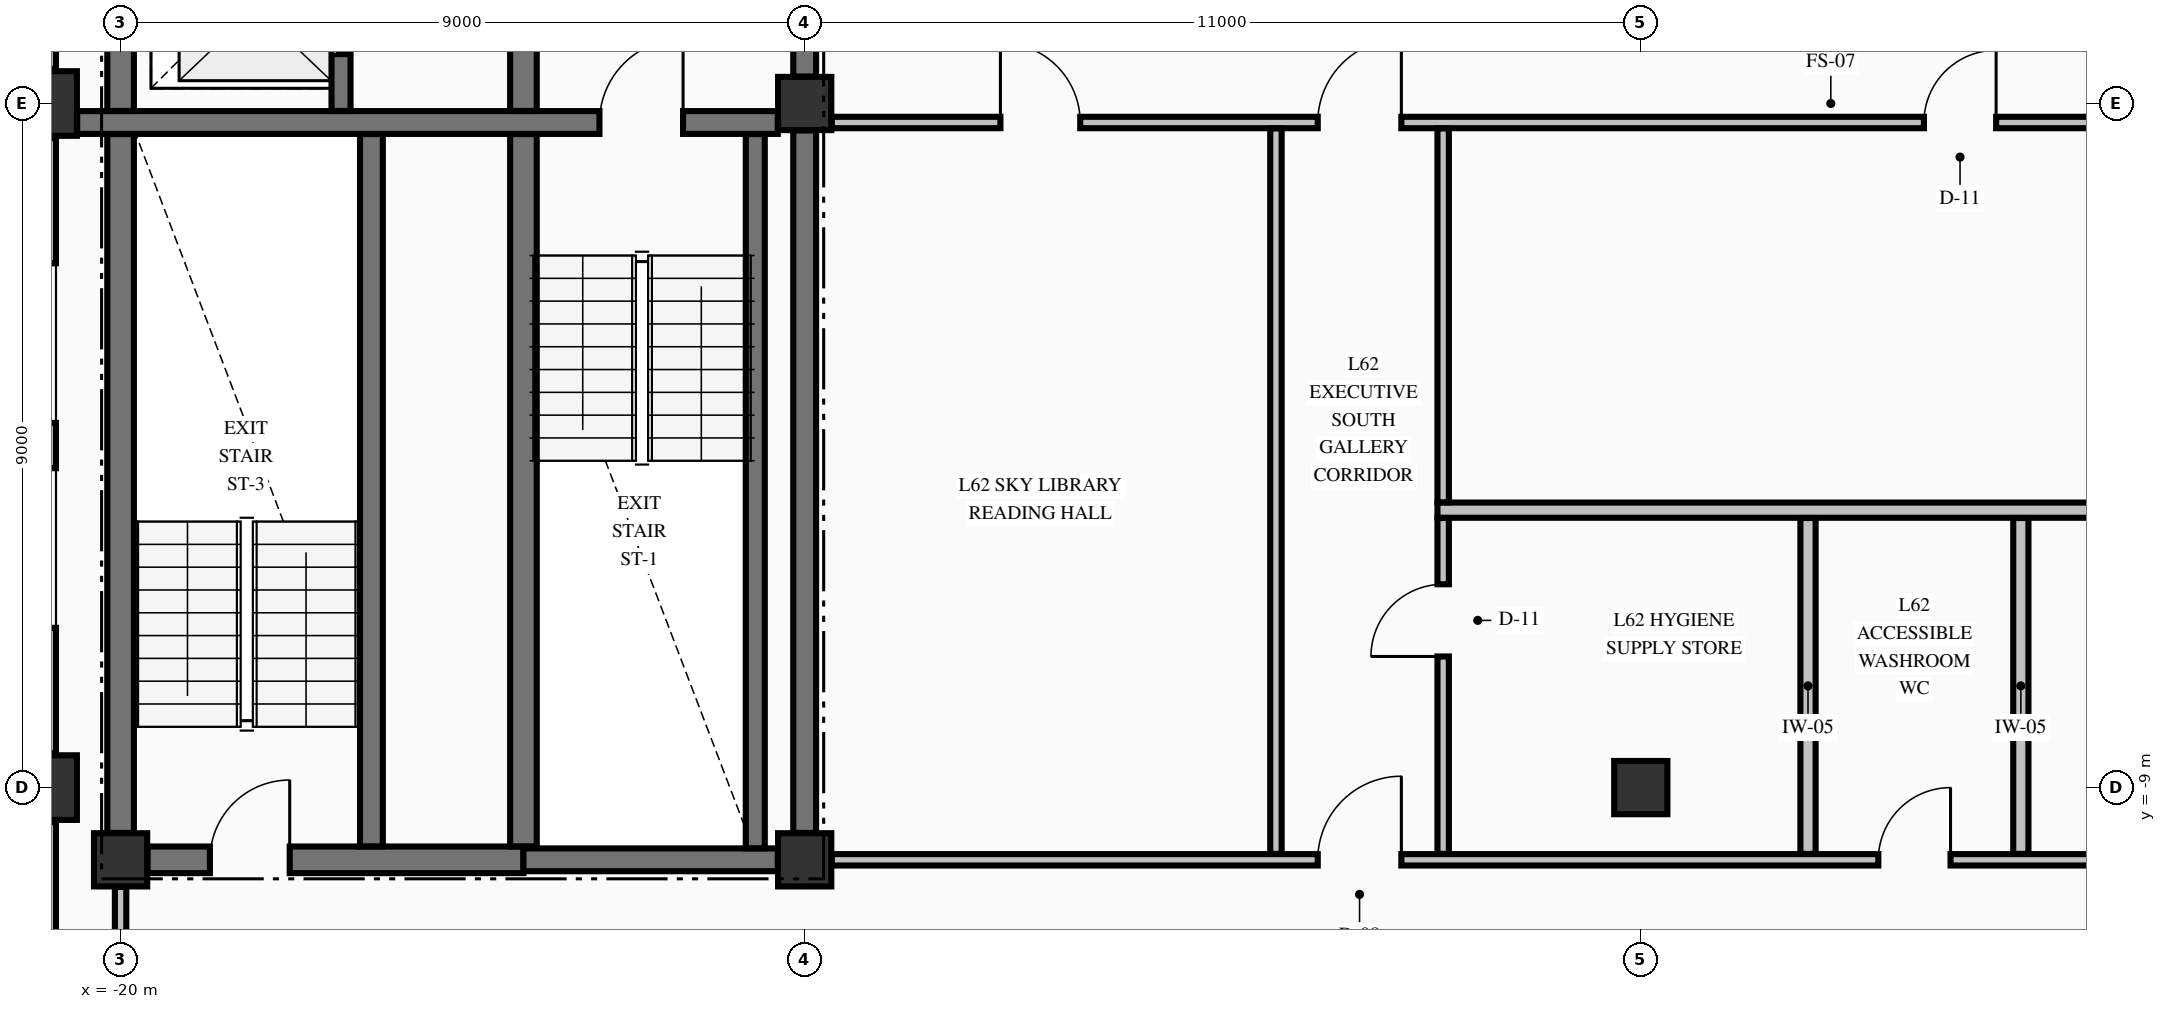
"""IFC4 building model, lengths in metres.
Left out: names, types, materials, properties, quantities, classifications, styles, units other than length and angle.
Written with IfcOpenShell. Run it as: python <this file> out.ifc"""

import sys

from ifc_helpers import new_model, si_unit, direction, frame, frame_2d, origin, origin_2d, place, context, subcontext, project, spatial, rectangle, extrude, element, fill, save


model = new_model("IFC4")
c1 = context("Model", 3, precision=1e-05, world=origin(), true_north=direction((0.0, 1.0)))
c2 = subcontext(c1, "Body", "Model", "MODEL_VIEW")
j1 = project(units=[si_unit("LENGTHUNIT", "METRE"), si_unit("PLANEANGLEUNIT", "RADIAN")], contexts=[c1])
p1 = place(None, origin())
s1 = spatial("IfcSite", under=j1, at=p1, CompositionType="ELEMENT")
p2 = place(p1, origin())
s2 = spatial("IfcBuilding", under=s1, at=p2, CompositionType="ELEMENT")
p3 = place(p2, frame((0.0, 0.0, 236.51)))
s3 = spatial("IfcBuildingStorey", under=s2, at=p3, CompositionType="ELEMENT", Elevation=236.51)
for number, where, z_axis, x_axis in (
    (1, (-21.0, -9.0, -0.25), (0.0, 0.0, 1.0), (1.0, 0.0, 0.0)),
    (2, (-21.0, 0.0, -0.25), (0.0, 0.0, 1.0), (1.0, 0.0, 0.0)),
):
    element("IfcColumn", number, at=place(p3, frame(where, z_axis=z_axis, x_axis=x_axis)), inside=s3, PredefinedType="COLUMN", context=c2, shape_type="SweptSolid", body=[
        extrude(rectangle(XDim=0.85, YDim=0.85, at=origin_2d()), origin(), (0.0, 0.0, 1.0), 3.23),
    ])
for number, where, z_axis, x_axis in (
    (3, (-20.0, -9.95, -0.25), (0.0, 0.0, 1.0), (1.0, 0.0, 0.0)),
    (4, (-11.0, -9.95, -0.25), (0.0, 0.0, 1.0), (1.0, 0.0, 0.0)),
    (5, (-11.0, 0.0, -0.25), (0.0, 0.0, 1.0), (1.0, 0.0, 0.0)),
    (6, (0.0, -9.0, -0.25), (0.0, 0.0, 1.0), (1.0, 0.0, 0.0)),
):
    element("IfcColumn", number, at=place(p3, frame(where, z_axis=z_axis, x_axis=x_axis)), inside=s3, PredefinedType="COLUMN", context=c2, shape_type="SweptSolid", body=[
        extrude(rectangle(XDim=0.7, YDim=0.7, at=origin_2d()), origin(), (0.0, 0.0, 1.0), 3.23),
    ])
p4 = place(p3, frame((-21.0, -9.455, 0.0), z_axis=(0.0, 0.0, 1.0), x_axis=(0.0, -1.0, 0.0)))
e7 = element("IfcWall", 7, at=p4, inside=s3, PredefinedType="STANDARD", context=c2, shape_type="SweptSolid", body=[
    extrude(rectangle(XDim=8.09, YDim=0.3, at=frame_2d((4.045, 0.0))), origin(), (0.0, 0.0, 1.0), 2.372),
])
p5 = place(p3, frame((-21.0, -0.455, 0.0), z_axis=(0.0, 0.0, 1.0), x_axis=(0.0, -1.0, 0.0)))
e8 = element("IfcWall", 8, at=p5, inside=s3, PredefinedType="STANDARD", context=c2, shape_type="SweptSolid", body=[
    extrude(rectangle(XDim=8.09, YDim=0.3, at=frame_2d((4.045, 0.0))), origin(), (0.0, 0.0, 1.0), 2.372),
])
p6 = place(p5, frame((1.647, 0.0, 0.7)))
e9 = element("IfcOpeningElement", 9, at=p6, cuts=e8, PredefinedType="OPENING", context=c2, shape_type="SweptSolid", body=[
    extrude(rectangle(XDim=2.1, YDim=1.5, at=frame_2d((1.05, 0.75))), frame((0.0, 0.16, 0.0), z_axis=(0.0, -1.0, 0.0), x_axis=(1.0, 0.0, 0.0)), (0.0, 0.0, 1.0), 0.32),
])
p7 = place(p5, frame((4.343, 0.0, 0.7)))
e10 = element("IfcOpeningElement", 10, at=p7, cuts=e8, PredefinedType="OPENING", context=c2, shape_type="SweptSolid", body=[
    extrude(rectangle(XDim=2.1, YDim=1.5, at=frame_2d((1.05, 0.75))), frame((0.0, 0.16, 0.0), z_axis=(0.0, -1.0, 0.0), x_axis=(1.0, 0.0, 0.0)), (0.0, 0.0, 1.0), 0.32),
])
p8 = place(p3, frame((-21.0, 8.545, 0.0), z_axis=(0.0, 0.0, 1.0), x_axis=(0.0, -1.0, 0.0)))
e11 = element("IfcWall", 11, at=p8, inside=s3, PredefinedType="STANDARD", context=c2, shape_type="SweptSolid", body=[
    extrude(rectangle(XDim=8.09, YDim=0.3, at=frame_2d((4.045, 0.0))), origin(), (0.0, 0.0, 1.0), 2.372),
])
p9 = place(p8, frame((1.647, 0.0, 0.7)))
e12 = element("IfcOpeningElement", 12, at=p9, cuts=e11, PredefinedType="OPENING", context=c2, shape_type="SweptSolid", body=[
    extrude(rectangle(XDim=2.1, YDim=1.5, at=frame_2d((1.05, 0.75))), frame((0.0, 0.16, 0.0), z_axis=(0.0, -1.0, 0.0), x_axis=(1.0, 0.0, 0.0)), (0.0, 0.0, 1.0), 0.32),
])
p10 = place(p8, frame((4.343, 0.0, 0.7)))
e13 = element("IfcOpeningElement", 13, at=p10, cuts=e11, PredefinedType="OPENING", context=c2, shape_type="SweptSolid", body=[
    extrude(rectangle(XDim=2.1, YDim=1.5, at=frame_2d((1.05, 0.75))), frame((0.0, 0.16, 0.0), z_axis=(0.0, -1.0, 0.0), x_axis=(1.0, 0.0, 0.0)), (0.0, 0.0, 1.0), 0.32),
])
p11 = place(p3, frame((-19.646, -9.95, 0.0), z_axis=(0.0, 0.0, 1.0), x_axis=(1.0, 0.0, 0.0)))
e14 = element("IfcWall", 14, at=p11, inside=s3, PredefinedType="SHEAR", context=c2, shape_type="SweptSolid", body=[
    extrude(rectangle(XDim=4.946, YDim=0.35, at=frame_2d((2.473, 0.0))), origin(), (0.0, 0.0, 1.0), 2.98),
])
p12 = place(p11, frame((0.821, 0.0, 0.0)))
e15 = element("IfcOpeningElement", 15, at=p12, cuts=e14, PredefinedType="OPENING", context=c2, shape_type="SweptSolid", body=[
    extrude(rectangle(XDim=1.05, YDim=2.15, at=frame_2d((0.525, 1.075))), frame((0.0, 0.185, 0.0), z_axis=(0.0, -1.0, 0.0), x_axis=(1.0, 0.0, 0.0)), (0.0, 0.0, 1.0), 0.37),
])
p13 = place(p3, frame((-14.7, -9.95, 0.0), z_axis=(0.0, 0.0, 1.0), x_axis=(1.0, 0.0, 0.0)))
e16 = element("IfcWall", 16, at=p13, inside=s3, PredefinedType="SHEAR", context=c2, shape_type="SweptSolid", body=[
    extrude(rectangle(XDim=3.346, YDim=0.3, at=frame_2d((1.673, 0.0))), origin(), (0.0, 0.0, 1.0), 2.98),
])
p14 = place(p3, frame((-20.571, -0.25, 0.0), z_axis=(0.0, 0.0, 1.0), x_axis=(1.0, 0.0, 0.0)))
e17 = element("IfcWall", 17, at=p14, inside=s3, PredefinedType="SHEAR", context=c2, shape_type="SweptSolid", body=[
    extrude(rectangle(XDim=9.217, YDim=0.3, at=frame_2d((4.608, 0.0))), origin(), (0.0, 0.0, 1.0), 2.98),
])
p15 = place(p14, frame((6.871, 0.0, 0.0)))
e18 = element("IfcOpeningElement", 18, at=p15, cuts=e17, PredefinedType="OPENING", context=c2, shape_type="SweptSolid", body=[
    extrude(rectangle(XDim=1.1, YDim=2.15, at=frame_2d((0.55, 1.075))), frame((0.0, 0.16, 0.0), z_axis=(0.0, -1.0, 0.0), x_axis=(1.0, 0.0, 0.0)), (0.0, 0.0, 1.0), 0.32),
])
p16 = place(p3, frame((-10.644, -9.95, 0.0), z_axis=(0.0, 0.0, 1.0), x_axis=(1.0, 0.0, 0.0)))
e19 = element("IfcWall", 19, at=p16, inside=s3, PredefinedType="PARTITIONING", context=c2, shape_type="SweptSolid", body=[
    extrude(rectangle(XDim=21.288, YDim=0.15, at=frame_2d((10.644, 0.0))), origin(), (0.0, 0.0, 1.0), 2.98),
])
p17 = place(p16, frame((6.394, 0.0, 0.0)))
e20 = element("IfcOpeningElement", 20, at=p17, cuts=e19, PredefinedType="OPENING", context=c2, shape_type="SweptSolid", body=[
    extrude(rectangle(XDim=1.1, YDim=2.15, at=frame_2d((0.55, 1.075))), frame((0.0, 0.085, 0.0), z_axis=(0.0, -1.0, 0.0), x_axis=(1.0, 0.0, 0.0)), (0.0, 0.0, 1.0), 0.17),
])
p18 = place(p16, frame((13.769, 0.0, 0.0)))
e21 = element("IfcOpeningElement", 21, at=p18, cuts=e19, PredefinedType="OPENING", context=c2, shape_type="SweptSolid", body=[
    extrude(rectangle(XDim=0.95, YDim=2.15, at=frame_2d((0.475, 1.075))), frame((0.0, 0.085, 0.0), z_axis=(0.0, -1.0, 0.0), x_axis=(1.0, 0.0, 0.0)), (0.0, 0.0, 1.0), 0.17),
])
p19 = place(p16, frame((17.994, 0.0, 0.0)))
e22 = element("IfcOpeningElement", 22, at=p19, cuts=e19, PredefinedType="OPENING", context=c2, shape_type="SweptSolid", body=[
    extrude(rectangle(XDim=0.9, YDim=2.15, at=frame_2d((0.45, 1.075))), frame((0.0, 0.085, 0.0), z_axis=(0.0, -1.0, 0.0), x_axis=(1.0, 0.0, 0.0)), (0.0, 0.0, 1.0), 0.17),
])
p20 = place(p3, frame((-2.675, -5.35, 0.0), z_axis=(0.0, 0.0, 1.0), x_axis=(1.0, 0.0, 0.0)))
e23 = element("IfcWall", 23, at=p20, inside=s3, PredefinedType="PARTITIONING", context=c2, shape_type="SweptSolid", body=[
    extrude(rectangle(XDim=13.522, YDim=0.2, at=frame_2d((6.761, 0.0))), origin(), (0.0, 0.0, 1.0), 2.98),
])
p21 = place(p3, frame((-10.644, -0.25, 0.0), z_axis=(0.0, 0.0, 1.0), x_axis=(1.0, 0.0, 0.0)))
e24 = element("IfcWall", 24, at=p21, inside=s3, PredefinedType="PARTITIONING", context=c2, shape_type="SweptSolid", body=[
    extrude(rectangle(XDim=21.288, YDim=0.15, at=frame_2d((10.644, 0.0))), origin(), (0.0, 0.0, 1.0), 2.98),
])
p22 = place(p21, frame((6.394, 0.0, 0.0)))
e25 = element("IfcOpeningElement", 25, at=p22, cuts=e24, PredefinedType="OPENING", context=c2, shape_type="SweptSolid", body=[
    extrude(rectangle(XDim=1.1, YDim=2.15, at=frame_2d((0.55, 1.075))), frame((0.0, 0.085, 0.0), z_axis=(0.0, -1.0, 0.0), x_axis=(1.0, 0.0, 0.0)), (0.0, 0.0, 1.0), 0.17),
])
p23 = place(p21, frame((2.219, 0.0, 0.0)))
e26 = element("IfcOpeningElement", 26, at=p23, cuts=e24, PredefinedType="OPENING", context=c2, shape_type="SweptSolid", body=[
    extrude(rectangle(XDim=1.05, YDim=2.15, at=frame_2d((0.525, 1.075))), frame((0.0, 0.085, 0.0), z_axis=(0.0, -1.0, 0.0), x_axis=(1.0, 0.0, 0.0)), (0.0, 0.0, 1.0), 0.17),
])
p24 = place(p21, frame((14.369, 0.0, 0.0)))
e27 = element("IfcOpeningElement", 27, at=p24, cuts=e24, PredefinedType="OPENING", context=c2, shape_type="SweptSolid", body=[
    extrude(rectangle(XDim=0.95, YDim=2.15, at=frame_2d((0.475, 1.075))), frame((0.0, 0.085, 0.0), z_axis=(0.0, -1.0, 0.0), x_axis=(1.0, 0.0, 0.0)), (0.0, 0.0, 1.0), 0.17),
])
p25 = place(p3, frame((-20.0, -9.596, 0.0), z_axis=(0.0, 0.0, 1.0), x_axis=(0.0, 1.0, 0.0)))
e28 = element("IfcWall", 28, at=p25, inside=s3, PredefinedType="SHEAR", context=c2, shape_type="SweptSolid", body=[
    extrude(rectangle(XDim=9.194, YDim=0.35, at=frame_2d((4.597, 0.0))), origin(), (0.0, 0.0, 1.0), 2.98),
])
p26 = place(p3, frame((-20.0, -0.098, 0.0), z_axis=(0.0, 0.0, 1.0), x_axis=(0.0, 1.0, 0.0)))
e29 = element("IfcWall", 29, at=p26, inside=s3, PredefinedType="SHEAR", context=c2, shape_type="SweptSolid", body=[
    extrude(rectangle(XDim=2.621, YDim=0.35, at=frame_2d((1.311, 0.0))), origin(), (0.0, 0.0, 1.0), 2.98),
])
p27 = place(p3, frame((-17.1, -0.098, 0.0), z_axis=(0.0, 0.0, 1.0), x_axis=(0.0, 1.0, 0.0)))
e30 = element("IfcWall", 30, at=p27, inside=s3, PredefinedType="SOLIDWALL", context=c2, shape_type="SweptSolid", body=[
    extrude(rectangle(XDim=2.621, YDim=0.25, at=frame_2d((1.311, 0.0))), origin(), (0.0, 0.0, 1.0), 2.98),
])
p28 = place(p27, frame((0.748, 0.0, 0.0)))
e31 = element("IfcOpeningElement", 31, at=p28, cuts=e30, PredefinedType="OPENING", context=c2, shape_type="SweptSolid", body=[
    extrude(rectangle(XDim=1.1, YDim=2.2, at=frame_2d((0.55, 1.1))), frame((0.0, 0.135, 0.0), z_axis=(0.0, -1.0, 0.0), x_axis=(1.0, 0.0, 0.0)), (0.0, 0.0, 1.0), 0.27),
])
p29 = place(p3, frame((-16.7, -9.773, 0.0), z_axis=(0.0, 0.0, 1.0), x_axis=(0.0, 1.0, 0.0)))
e32 = element("IfcWall", 32, at=p29, inside=s3, PredefinedType="SHEAR", context=c2, shape_type="SweptSolid", body=[
    extrude(rectangle(XDim=9.371, YDim=0.3, at=frame_2d((4.686, 0.0))), origin(), (0.0, 0.0, 1.0), 2.98),
])
p30 = place(p3, frame((-14.7, -9.773, 0.0), z_axis=(0.0, 0.0, 1.0), x_axis=(0.0, 1.0, 0.0)))
e33 = element("IfcWall", 33, at=p30, inside=s3, PredefinedType="SHEAR", context=c2, shape_type="SweptSolid", body=[
    extrude(rectangle(XDim=9.371, YDim=0.35, at=frame_2d((4.686, 0.0))), origin(), (0.0, 0.0, 1.0), 2.98),
])
p31 = place(p3, frame((-14.7, -0.098, 0.0), z_axis=(0.0, 0.0, 1.0), x_axis=(0.0, 1.0, 0.0)))
e34 = element("IfcWall", 34, at=p31, inside=s3, PredefinedType="SHEAR", context=c2, shape_type="SweptSolid", body=[
    extrude(rectangle(XDim=2.846, YDim=0.35, at=frame_2d((1.423, 0.0))), origin(), (0.0, 0.0, 1.0), 2.98),
])
p32 = place(p3, frame((-11.65, -9.798, 0.0), z_axis=(0.0, 0.0, 1.0), x_axis=(0.0, 1.0, 0.0)))
e35 = element("IfcWall", 35, at=p32, inside=s3, PredefinedType="SOLIDWALL", context=c2, shape_type="SweptSolid", body=[
    extrude(rectangle(XDim=9.396, YDim=0.25, at=frame_2d((4.698, 0.0))), origin(), (0.0, 0.0, 1.0), 2.98),
])
p33 = place(p3, frame((-11.0, -9.596, 0.0), z_axis=(0.0, 0.0, 1.0), x_axis=(0.0, 1.0, 0.0)))
e36 = element("IfcWall", 36, at=p33, inside=s3, PredefinedType="SHEAR", context=c2, shape_type="SweptSolid", body=[
    extrude(rectangle(XDim=9.242, YDim=0.3, at=frame_2d((4.621, 0.0))), origin(), (0.0, 0.0, 1.0), 2.98),
])
p34 = place(p3, frame((-11.0, 0.354, 0.0), z_axis=(0.0, 0.0, 1.0), x_axis=(0.0, 1.0, 0.0)))
e37 = element("IfcWall", 37, at=p34, inside=s3, PredefinedType="SHEAR", context=c2, shape_type="SweptSolid", body=[
    extrude(rectangle(XDim=2.394, YDim=0.3, at=frame_2d((1.197, 0.0))), origin(), (0.0, 0.0, 1.0), 2.98),
])
p35 = place(p34, frame((0.746, 0.0, 0.0)))
e38 = element("IfcOpeningElement", 38, at=p35, cuts=e37, PredefinedType="OPENING", context=c2, shape_type="SweptSolid", body=[
    extrude(rectangle(XDim=1.1, YDim=2.15, at=frame_2d((0.55, 1.075))), frame((0.0, 0.16, 0.0), z_axis=(0.0, -1.0, 0.0), x_axis=(1.0, 0.0, 0.0)), (0.0, 0.0, 1.0), 0.32),
])
p36 = place(p3, frame((-20.0, -12.122, 0.0), z_axis=(0.0, 0.0, 1.0), x_axis=(0.0, 1.0, 0.0)))
e39 = element("IfcWall", 39, at=p36, inside=s3, PredefinedType="PARTITIONING", context=c2, shape_type="SweptSolid", body=[
    extrude(rectangle(XDim=1.816, YDim=0.15, at=frame_2d((0.908, 0.0))), origin(), (0.0, 0.0, 1.0), 2.57),
])
p37 = place(p3, frame((-4.8, -9.872, 0.0), z_axis=(0.0, 0.0, 1.0), x_axis=(0.0, 1.0, 0.0)))
e40 = element("IfcWall", 40, at=p37, inside=s3, PredefinedType="PARTITIONING", context=c2, shape_type="SweptSolid", body=[
    extrude(rectangle(XDim=9.544, YDim=0.15, at=frame_2d((4.772, 0.0))), origin(), (0.0, 0.0, 1.0), 2.98),
])
p38 = place(p3, frame((-2.6, -9.872, 0.0), z_axis=(0.0, 0.0, 1.0), x_axis=(0.0, 1.0, 0.0)))
e41 = element("IfcWall", 41, at=p38, inside=s3, PredefinedType="PARTITIONING", context=c2, shape_type="SweptSolid", body=[
    extrude(rectangle(XDim=4.419, YDim=0.15, at=frame_2d((2.209, 0.0))), origin(), (0.0, 0.0, 1.0), 2.98),
])
p39 = place(p38, frame((2.597, 0.0, 0.0)))
e42 = element("IfcOpeningElement", 42, at=p39, cuts=e41, PredefinedType="OPENING", context=c2, shape_type="SweptSolid", body=[
    extrude(rectangle(XDim=0.95, YDim=2.15, at=frame_2d((0.475, 1.075))), frame((0.0, 0.085, 0.0), z_axis=(0.0, -1.0, 0.0), x_axis=(1.0, 0.0, 0.0)), (0.0, 0.0, 1.0), 0.17),
])
p40 = place(p3, frame((-2.6, -5.247, 0.0), z_axis=(0.0, 0.0, 1.0), x_axis=(0.0, 1.0, 0.0)))
e43 = element("IfcWall", 43, at=p40, inside=s3, PredefinedType="PARTITIONING", context=c2, shape_type="SweptSolid", body=[
    extrude(rectangle(XDim=4.919, YDim=0.15, at=frame_2d((2.459, 0.0))), origin(), (0.0, 0.0, 1.0), 2.98),
])
for number, where, z_axis, x_axis in (
    (44, (2.2, -9.872, 0.0), (0.0, 0.0, 1.0), (0.0, 1.0, 0.0)),
    (45, (5.0, -9.872, 0.0), (0.0, 0.0, 1.0), (0.0, 1.0, 0.0)),
):
    element("IfcWall", number, at=place(p3, frame(where, z_axis=z_axis, x_axis=x_axis)), inside=s3, PredefinedType="PARTITIONING", context=c2, shape_type="SweptSolid", body=[
        extrude(rectangle(XDim=4.419, YDim=0.2, at=frame_2d((2.209, 0.0))), origin(), (0.0, 0.0, 1.0), 2.98),
    ])
p41 = place(p15, origin())
e46 = element("IfcDoor", 46, at=p41, inside=s3, OperationType="SINGLE_SWING_RIGHT", PredefinedType="DOOR", context=c2, shape_type="SweptSolid", body=[
    extrude(rectangle(XDim=1.1, YDim=2.15, at=frame_2d((0.55, 1.075))), frame((0.0, 0.025, 0.0), z_axis=(0.0, -1.0, 0.0), x_axis=(1.0, 0.0, 0.0)), (0.0, 0.0, 1.0), 0.05),
])
fill(e18, e46)
p42 = place(p12, origin())
e47 = element("IfcDoor", 47, at=p42, inside=s3, OperationType="SINGLE_SWING_RIGHT", PredefinedType="DOOR", context=c2, shape_type="SweptSolid", body=[
    extrude(rectangle(XDim=1.05, YDim=2.15, at=frame_2d((0.525, 1.075))), frame((0.0, 0.025, 0.0), z_axis=(0.0, -1.0, 0.0), x_axis=(1.0, 0.0, 0.0)), (0.0, 0.0, 1.0), 0.05),
])
fill(e15, e47)
p43 = place(p28, origin())
e48 = element("IfcDoor", 48, at=p43, inside=s3, OperationType="SLIDING_TO_LEFT", PredefinedType="DOOR", context=c2, shape_type="SweptSolid", body=[
    extrude(rectangle(XDim=1.1, YDim=2.2, at=frame_2d((0.55, 1.1))), frame((0.0, 0.025, 0.0), z_axis=(0.0, -1.0, 0.0), x_axis=(1.0, 0.0, 0.0)), (0.0, 0.0, 1.0), 0.05),
])
fill(e31, e48)
p44 = place(p17, origin())
e49 = element("IfcDoor", 49, at=p44, inside=s3, OperationType="SINGLE_SWING_RIGHT", PredefinedType="DOOR", context=c2, shape_type="SweptSolid", body=[
    extrude(rectangle(XDim=1.1, YDim=2.15, at=frame_2d((0.55, 1.075))), frame((0.0, 0.025, 0.0), z_axis=(0.0, -1.0, 0.0), x_axis=(1.0, 0.0, 0.0)), (0.0, 0.0, 1.0), 0.05),
])
fill(e20, e49)
p45 = place(p22, origin())
e50 = element("IfcDoor", 50, at=p45, inside=s3, OperationType="SINGLE_SWING_RIGHT", PredefinedType="DOOR", context=c2, shape_type="SweptSolid", body=[
    extrude(rectangle(XDim=1.1, YDim=2.15, at=frame_2d((0.55, 1.075))), frame((0.0, 0.025, 0.0), z_axis=(0.0, -1.0, 0.0), x_axis=(1.0, 0.0, 0.0)), (0.0, 0.0, 1.0), 0.05),
])
fill(e25, e50)
p46 = place(p23, origin())
e51 = element("IfcDoor", 51, at=p46, inside=s3, OperationType="SINGLE_SWING_LEFT", PredefinedType="DOOR", context=c2, shape_type="SweptSolid", body=[
    extrude(rectangle(XDim=1.05, YDim=2.15, at=frame_2d((0.525, 1.075))), frame((0.0, 0.025, 0.0), z_axis=(0.0, -1.0, 0.0), x_axis=(1.0, 0.0, 0.0)), (0.0, 0.0, 1.0), 0.05),
])
fill(e26, e51)
p47 = place(p24, origin())
e52 = element("IfcDoor", 52, at=p47, inside=s3, OperationType="SINGLE_SWING_RIGHT", PredefinedType="DOOR", context=c2, shape_type="SweptSolid", body=[
    extrude(rectangle(XDim=0.95, YDim=2.15, at=frame_2d((0.475, 1.075))), frame((0.0, 0.025, 0.0), z_axis=(0.0, -1.0, 0.0), x_axis=(1.0, 0.0, 0.0)), (0.0, 0.0, 1.0), 0.05),
])
fill(e27, e52)
p48 = place(p39, origin())
e53 = element("IfcDoor", 53, at=p48, inside=s3, OperationType="SINGLE_SWING_LEFT", PredefinedType="DOOR", context=c2, shape_type="SweptSolid", body=[
    extrude(rectangle(XDim=0.95, YDim=2.15, at=frame_2d((0.475, 1.075))), frame((0.0, 0.025, 0.0), z_axis=(0.0, -1.0, 0.0), x_axis=(1.0, 0.0, 0.0)), (0.0, 0.0, 1.0), 0.05),
])
fill(e42, e53)
p49 = place(p18, origin())
e54 = element("IfcDoor", 54, at=p49, inside=s3, OperationType="SINGLE_SWING_RIGHT", PredefinedType="DOOR", context=c2, shape_type="SweptSolid", body=[
    extrude(rectangle(XDim=0.95, YDim=2.15, at=frame_2d((0.475, 1.075))), frame((0.0, 0.025, 0.0), z_axis=(0.0, -1.0, 0.0), x_axis=(1.0, 0.0, 0.0)), (0.0, 0.0, 1.0), 0.05),
])
fill(e21, e54)
save(model, sys.argv[1])
